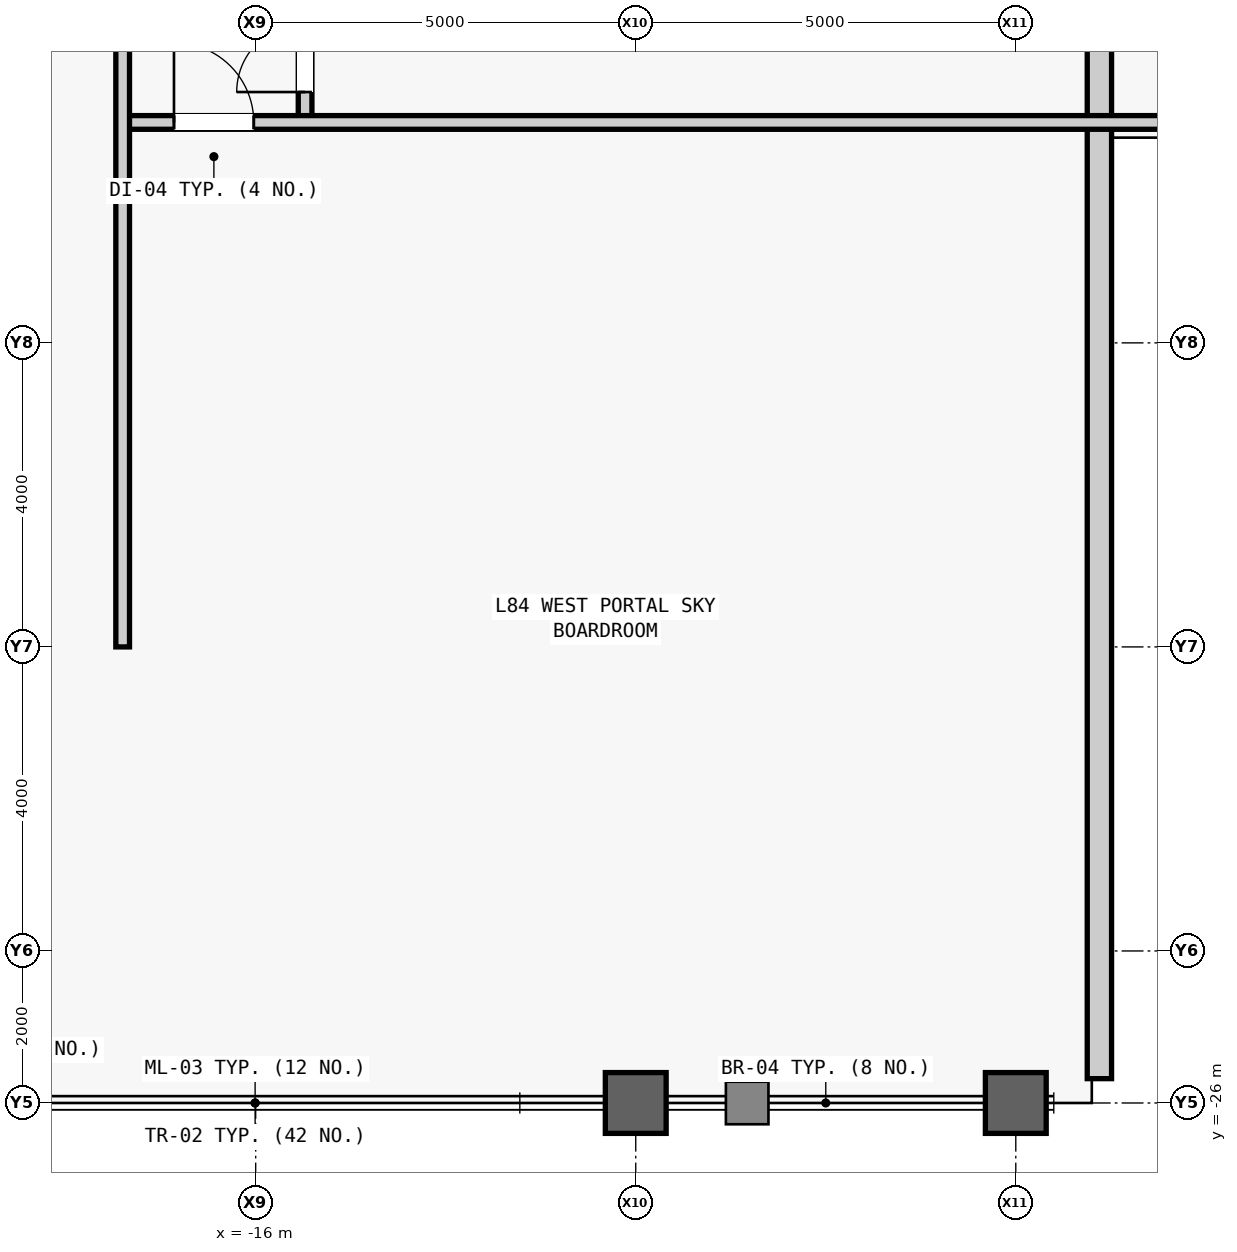
"""IFC4 building model, lengths in metres.
Left out: names, types, materials, properties, quantities, classifications, styles, units other than length and angle.
Written with IfcOpenShell. Run it as: python <this file> out.ifc"""

import sys

from ifc_helpers import new_model, si_unit, direction, frame, frame_2d, origin, origin_2d, place, context, subcontext, project, spatial, rectangle, hollow_rectangle, extrude, source, transform, mapped, element, fill, save


model = new_model("IFC4")
c1 = context("Model", 3, precision=1e-05, world=origin(), true_north=direction((0.0, 1.0)))
c2 = subcontext(c1, "Body", "Model", "MODEL_VIEW")
j1 = project(units=[si_unit("LENGTHUNIT", "METRE"), si_unit("PLANEANGLEUNIT", "RADIAN")], contexts=[c1])
p1 = place(None, origin())
s1 = spatial("IfcSite", under=j1, at=p1, CompositionType="ELEMENT")
p2 = place(p1, origin())
s2 = spatial("IfcBuilding", under=s1, at=p2, CompositionType="ELEMENT")
p3 = place(p2, frame((0.0, 0.0, 354.3)))
s3 = spatial("IfcBuildingStorey", under=s2, at=p3, CompositionType="ELEMENT", Elevation=354.3)
m1 = source(origin(), c2, "Body", "SweptSolid", [
    extrude(hollow_rectangle(XDim=0.8, YDim=0.8, WallThickness=0.045, at=origin_2d()), origin(), (0.0, 0.0, 1.0), 4.0),
])
for number, where, z_axis, x_axis in (
    (1, (-11.0, -26.0, 0.0), (0.0, 0.0, 1.0), (1.0, 0.0, 0.0)),
    (2, (-6.0, -26.0, 0.0), (0.0, 0.0, 1.0), (1.0, 0.0, 0.0)),
):
    element("IfcColumn", number, at=place(p3, frame(where, z_axis=z_axis, x_axis=x_axis)), inside=s3, PredefinedType="COLUMN", context=c2, shape_type="MappedRepresentation", body=[
        mapped(m1, transform((0.0, 0.0, 0.0), scale=1.0)),
    ])
m2 = source(origin(), c2, "Body", "SweptSolid", [
    extrude(rectangle(XDim=14.98, YDim=0.32, at=frame_2d((7.49, 0.0))), origin(), (0.0, 0.0, 1.0), 3.045),
])
p4 = place(p3, frame((-4.9, -25.68, 0.0), z_axis=(0.0, 0.0, 1.0), x_axis=(0.0, 1.0, 0.0)))
e3 = element("IfcWall", 3, at=p4, inside=s3, PredefinedType="STANDARD", context=c2, shape_type="MappedRepresentation", body=[
    mapped(m2, transform((0.0, 0.0, 0.0), scale=1.0)),
])
m3 = source(origin(), c2, "Body", "SweptSolid", [
    extrude(rectangle(XDim=2.6, YDim=0.18, at=frame_2d((1.3, 0.0))), origin(), (0.0, 0.0, 1.0), 3.74),
])
p5 = place(p3, frame((-15.35, -13.1, 0.0), z_axis=(0.0, 0.0, 1.0), x_axis=(0.0, 1.0, 0.0)))
e4 = element("IfcWall", 4, at=p5, inside=s3, PredefinedType="PARTITIONING", context=c2, shape_type="MappedRepresentation", body=[
    mapped(m3, transform((0.0, 0.0, 0.0), scale=1.0)),
])
m4 = source(origin(), c2, "Body", "SweptSolid", [
    extrude(rectangle(XDim=1.8, YDim=2.25, at=frame_2d((0.9, 1.125))), frame((0.0, 0.1, 0.0), z_axis=(0.0, -1.0, 0.0), x_axis=(1.0, 0.0, 0.0)), (0.0, 0.0, 1.0), 0.2),
])
p6 = place(p5, frame((0.4, 0.0, 0.0)))
e5 = element("IfcOpeningElement", 5, at=p6, cuts=e4, PredefinedType="OPENING", context=c2, shape_type="MappedRepresentation", body=[
    mapped(m4, transform((0.0, 0.0, 0.0), scale=1.0)),
])
m5 = source(origin(), c2, "Body", "SweptSolid", [
    extrude(rectangle(XDim=22.55, YDim=0.18, at=frame_2d((11.275, 0.0))), origin(), (0.0, 0.0, 1.0), 3.74),
])
p7 = place(p3, frame((-17.75, -13.1, 0.0), z_axis=(0.0, 0.0, 1.0), x_axis=(1.0, 0.0, 0.0)))
e6 = element("IfcWall", 6, at=p7, inside=s3, PredefinedType="PARTITIONING", context=c2, shape_type="MappedRepresentation", body=[
    mapped(m5, transform((0.0, 0.0, 0.0), scale=1.0)),
])
m6 = source(origin(), c2, "Body", "SweptSolid", [
    extrude(rectangle(XDim=1.05, YDim=2.2, at=frame_2d((0.525, 1.1))), frame((0.0, 0.1, 0.0), z_axis=(0.0, -1.0, 0.0), x_axis=(1.0, 0.0, 0.0)), (0.0, 0.0, 1.0), 0.2),
])
p8 = place(p7, frame((0.675, 0.0, 0.0)))
e7 = element("IfcOpeningElement", 7, at=p8, cuts=e6, PredefinedType="OPENING", context=c2, shape_type="MappedRepresentation", body=[
    mapped(m6, transform((0.0, 0.0, 0.0), scale=1.0)),
])
m7 = source(origin(), c2, "Body", "SweptSolid", [
    extrude(rectangle(XDim=40.0, YDim=0.18, at=frame_2d((20.0, 0.0))), origin(), (0.0, 0.0, 1.0), 3.74),
])
p9 = place(p3, frame((-17.75, -20.0, 0.0), z_axis=(0.0, 0.0, 1.0), x_axis=(0.0, 1.0, 0.0)))
e8 = element("IfcWall", 8, at=p9, inside=s3, PredefinedType="PARTITIONING", context=c2, shape_type="MappedRepresentation", body=[
    mapped(m7, transform((0.0, 0.0, 0.0), scale=1.0)),
])
m8 = source(origin(), c2, "Body", "SweptSolid", [
    extrude(rectangle(XDim=0.95, YDim=2.15, at=frame_2d((0.475, 1.075))), frame((0.0, 0.1, 0.0), z_axis=(0.0, -1.0, 0.0), x_axis=(1.0, 0.0, 0.0)), (0.0, 0.0, 1.0), 0.2),
])
p10 = place(p9, frame((11.389, 0.0, 0.0)))
e9 = element("IfcOpeningElement", 9, at=p10, cuts=e8, PredefinedType="OPENING", context=c2, shape_type="MappedRepresentation", body=[
    mapped(m8, transform((0.0, 0.0, 0.0), scale=1.0)),
])
p11 = place(p9, frame((17.473, 0.0, 0.0)))
e10 = element("IfcOpeningElement", 10, at=p11, cuts=e8, PredefinedType="OPENING", context=c2, shape_type="MappedRepresentation", body=[
    mapped(m8, transform((0.0, 0.0, 0.0), scale=1.0)),
])
p12 = place(p9, frame((23.857, 0.0, 0.0)))
e11 = element("IfcOpeningElement", 11, at=p12, cuts=e8, PredefinedType="OPENING", context=c2, shape_type="MappedRepresentation", body=[
    mapped(m8, transform((0.0, 0.0, 0.0), scale=1.0)),
])
p13 = place(p9, frame((28.573, 0.0, 0.0)))
e12 = element("IfcOpeningElement", 12, at=p13, cuts=e8, PredefinedType="OPENING", context=c2, shape_type="MappedRepresentation", body=[
    mapped(m8, transform((0.0, 0.0, 0.0), scale=1.0)),
])
m9 = source(origin(), c2, "Body", "SweptSolid", [
    extrude(rectangle(XDim=1.8, YDim=2.25, at=frame_2d((0.9, 1.125))), frame((0.0, 0.025, 0.0), z_axis=(0.0, -1.0, 0.0), x_axis=(1.0, 0.0, 0.0)), (0.0, 0.0, 1.0), 0.05),
])
p14 = place(p6, origin())
e13 = element("IfcDoor", 13, at=p14, inside=s3, OperationType="DOUBLE_DOOR_SINGLE_SWING", PredefinedType="DOOR", context=c2, shape_type="MappedRepresentation", body=[
    mapped(m9, transform((0.0, 0.0, 0.0), scale=1.0)),
])
fill(e5, e13)
m10 = source(origin(), c2, "Body", "SweptSolid", [
    extrude(rectangle(XDim=1.05, YDim=2.2, at=frame_2d((0.525, 1.1))), frame((0.0, 0.025, 0.0), z_axis=(0.0, -1.0, 0.0), x_axis=(1.0, 0.0, 0.0)), (0.0, 0.0, 1.0), 0.05),
])
p15 = place(p8, origin())
e14 = element("IfcDoor", 14, at=p15, inside=s3, OperationType="SINGLE_SWING_LEFT", PredefinedType="DOOR", context=c2, shape_type="MappedRepresentation", body=[
    mapped(m10, transform((0.0, 0.0, 0.0), scale=1.0)),
])
fill(e7, e14)
save(model, sys.argv[1])
